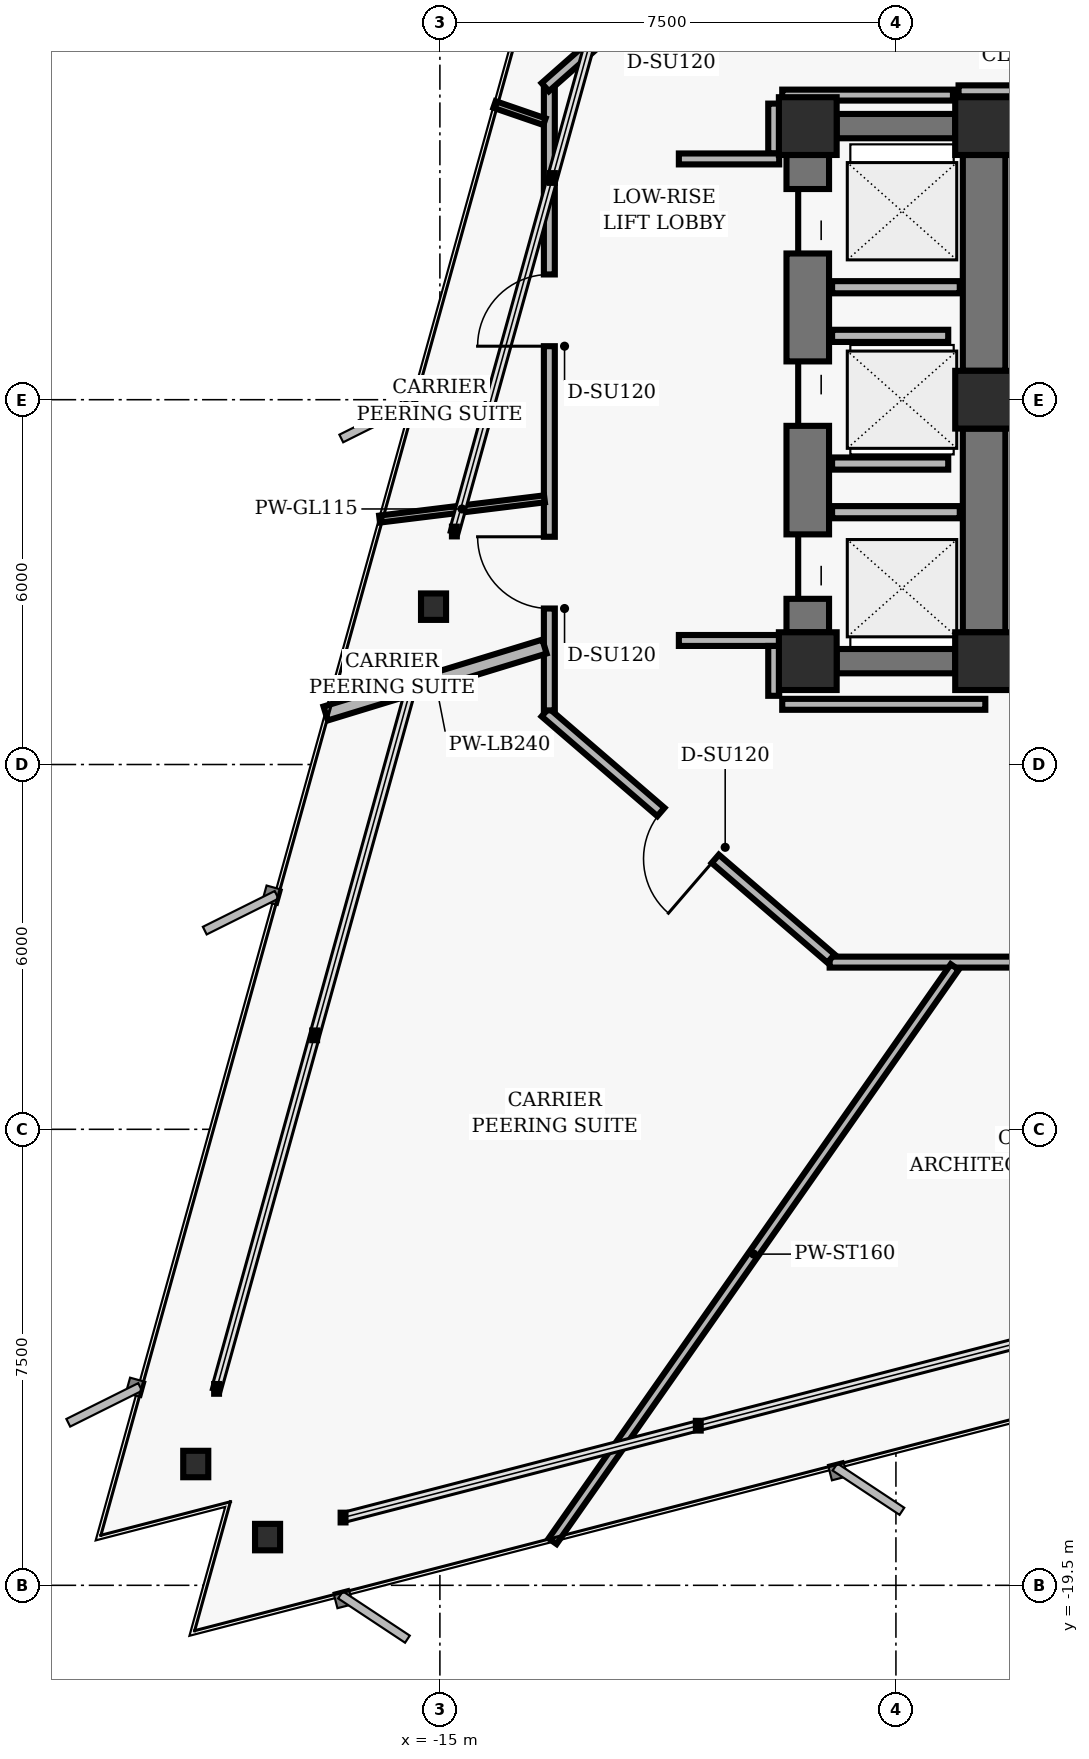
"""IFC4 building model, lengths in metres.
Left out: names, types, materials, properties, quantities, classifications, styles, units other than length and angle.
Written with IfcOpenShell. Run it as: python <this file> out.ifc"""

import sys

from ifc_helpers import new_model, si_unit, direction, frame, frame_2d, origin, origin_2d, place, context, subcontext, project, spatial, rectangle, hollow_rectangle, i_section, extrude, element, fill, save


model = new_model("IFC4")
c1 = context("Model", 3, precision=1e-05, world=origin(), true_north=direction((0.0, 1.0)))
c2 = subcontext(c1, "Body", "Model", "MODEL_VIEW")
j1 = project(units=[si_unit("LENGTHUNIT", "METRE"), si_unit("PLANEANGLEUNIT", "RADIAN")], contexts=[c1])
p1 = place(None, origin())
s1 = spatial("IfcSite", under=j1, at=p1, CompositionType="ELEMENT")
p2 = place(p1, origin())
s2 = spatial("IfcBuilding", under=s1, at=p2, CompositionType="ELEMENT")
p3 = place(p2, frame((0.0, 0.0, 91.68)))
s3 = spatial("IfcBuildingStorey", under=s2, at=p3, CompositionType="ELEMENT", Elevation=91.68)
for number, where, z_axis, x_axis in (
    (1, (-6.05, 4.5, 0.0), (0.0, 0.0, 1.0), (1.0, 0.0, 0.0)),
    (2, (-6.05, 0.0, 0.0), (0.0, 0.0, 1.0), (1.0, 0.0, 0.0)),
    (3, (-6.05, -4.3, 0.0), (0.0, 0.0, 1.0), (1.0, 0.0, 0.0)),
    (4, (-8.95, 4.5, 0.0), (0.0, 0.0, 1.0), (1.0, 0.0, 0.0)),
    (5, (-8.95, -4.3, 0.0), (0.0, 0.0, 1.0), (1.0, 0.0, 0.0)),
):
    element("IfcColumn", number, at=place(p3, frame(where, z_axis=z_axis, x_axis=x_axis)), inside=s3, PredefinedType="COLUMN", context=c2, shape_type="SweptSolid", body=[
        extrude(hollow_rectangle(XDim=0.95, YDim=0.95, WallThickness=0.06, InnerFilletRadius=0.02, OuterFilletRadius=0.04, at=origin_2d()), origin(), (0.0, 0.0, 1.0), 3.04),
    ])
p4 = place(p3, frame((-6.05, 0.475, 0.0), z_axis=(0.0, 0.0, 1.0), x_axis=(0.0, 1.0, 0.0)))
e6 = element("IfcWall", 6, at=p4, inside=s3, PredefinedType="SHEAR", context=c2, shape_type="SweptSolid", body=[
    extrude(rectangle(XDim=3.55, YDim=0.7, at=frame_2d((1.775, 0.0))), origin(), (0.0, 0.0, 1.0), 2.788),
])
p5 = place(p3, frame((-6.05, -3.825, 0.0), z_axis=(0.0, 0.0, 1.0), x_axis=(0.0, 1.0, 0.0)))
e7 = element("IfcWall", 7, at=p5, inside=s3, PredefinedType="SHEAR", context=c2, shape_type="SweptSolid", body=[
    extrude(rectangle(XDim=3.35, YDim=0.7, at=frame_2d((1.675, 0.0))), origin(), (0.0, 0.0, 1.0), 2.788),
])
p6 = place(p3, frame((-8.95, -3.825, 0.0), z_axis=(0.0, 0.0, 1.0), x_axis=(0.0, 1.0, 0.0)))
e8 = element("IfcWall", 8, at=p6, inside=s3, PredefinedType="SHEAR", context=c2, shape_type="SweptSolid", body=[
    extrude(rectangle(XDim=7.85, YDim=0.7, at=frame_2d((3.925, 0.0))), origin(), (0.0, 0.0, 1.0), 2.788),
])
p7 = place(p6, frame((0.55, 0.0, 0.0)))
e9 = element("IfcOpeningElement", 9, at=p7, cuts=e8, PredefinedType="OPENING", context=c2, shape_type="SweptSolid", body=[
    extrude(rectangle(XDim=1.06, YDim=2.04, at=frame_2d((0.53, 1.02))), frame((0.0, 0.36, 0.0), z_axis=(0.0, -1.0, 0.0), x_axis=(1.0, 0.0, 0.0)), (0.0, 0.0, 1.0), 0.72),
])
p8 = place(p6, frame((3.395, 0.0, 0.0)))
e10 = element("IfcOpeningElement", 10, at=p8, cuts=e8, PredefinedType="OPENING", context=c2, shape_type="SweptSolid", body=[
    extrude(rectangle(XDim=1.06, YDim=2.04, at=frame_2d((0.53, 1.02))), frame((0.0, 0.36, 0.0), z_axis=(0.0, -1.0, 0.0), x_axis=(1.0, 0.0, 0.0)), (0.0, 0.0, 1.0), 0.72),
])
p9 = place(p6, frame((6.23, 0.0, 0.0)))
e11 = element("IfcOpeningElement", 11, at=p9, cuts=e8, PredefinedType="OPENING", context=c2, shape_type="SweptSolid", body=[
    extrude(rectangle(XDim=1.06, YDim=2.04, at=frame_2d((0.53, 1.02))), frame((0.0, 0.36, 0.0), z_axis=(0.0, -1.0, 0.0), x_axis=(1.0, 0.0, 0.0)), (0.0, 0.0, 1.0), 0.72),
])
for number, where, z_axis, x_axis in (
    (12, (-8.475, 4.5, 0.0), (0.0, 0.0, 1.0), (1.0, 0.0, 0.0)),
    (13, (-8.475, -4.3, 0.0), (0.0, 0.0, 1.0), (1.0, 0.0, 0.0)),
):
    element("IfcWall", number, at=place(p3, frame(where, z_axis=z_axis, x_axis=x_axis)), inside=s3, PredefinedType="SHEAR", context=c2, shape_type="SweptSolid", body=[
        extrude(rectangle(XDim=1.95, YDim=0.4, at=frame_2d((0.975, 0.0))), origin(), (0.0, 0.0, 1.0), 2.788),
    ])
for number, where, z_axis, x_axis in (
    (14, (-15.104, -3.404, 0.0), (0.0, 0.0, 1.0), (1.0, 0.0, 0.0)),
    (15, (-19.015, -17.505, 0.0), (0.0, 0.0, 1.0), (1.0, 0.0, 0.0)),
    (16, (-17.834, -18.707, 0.0), (0.0, 0.0, 1.0), (1.0, 0.0, 0.0)),
):
    element("IfcColumn", number, at=place(p3, frame(where, z_axis=z_axis, x_axis=x_axis)), inside=s3, PredefinedType="COLUMN", context=c2, shape_type="SweptSolid", body=[
        extrude(i_section(OverallWidth=0.412, OverallDepth=0.435, WebThickness=0.036, FlangeThickness=0.057, FilletRadius=0.022, at=origin_2d()), origin(), (0.0, 0.0, 1.0), 3.04),
    ])
for number, where, z_axis, x_axis in (
    (17, (-8.55, -1.85, 0.0), (0.0, 0.0, 1.0), (1.0, 0.0, 0.0)),
    (18, (-8.55, 1.85, 0.0), (0.0, 0.0, 1.0), (1.0, 0.0, 0.0)),
):
    element("IfcWall", number, at=place(p3, frame(where, z_axis=z_axis, x_axis=x_axis)), inside=s3, PredefinedType="PARTITIONING", context=c2, shape_type="SweptSolid", body=[
        extrude(rectangle(XDim=2.1, YDim=0.2, at=frame_2d((1.05, 0.0))), origin(), (0.0, 0.0, 1.0), 2.763),
    ])
for number, where, z_axis, x_axis in (
    (19, (-8.55, -1.05, 0.0), (0.0, 0.0, 1.0), (1.0, 0.0, 0.0)),
    (20, (-8.55, 1.05, 0.0), (0.0, 0.0, 1.0), (1.0, 0.0, 0.0)),
):
    element("IfcWall", number, at=place(p3, frame(where, z_axis=z_axis, x_axis=x_axis)), inside=s3, PredefinedType="PARTITIONING", context=c2, shape_type="SweptSolid", body=[
        extrude(rectangle(XDim=1.91, YDim=0.2, at=frame_2d((0.955, 0.0))), origin(), (0.0, 0.0, 1.0), 2.763),
    ])
p10 = place(p3, frame((8.41, -9.25, 0.0), z_axis=(0.0, 0.0, 1.0), x_axis=(-1.0, 0.0, 0.0)))
e21 = element("IfcWall", 21, at=p10, inside=s3, PredefinedType="PARTITIONING", context=c2, shape_type="SweptSolid", body=[
    extrude(rectangle(XDim=17.0, YDim=0.18, at=frame_2d((8.5, 0.0))), origin(), (0.0, 0.0, 1.0), 2.277),
])
p11 = place(p10, frame((10.795, 0.0, 0.0)))
e22 = element("IfcOpeningElement", 22, at=p11, cuts=e21, PredefinedType="OPENING", context=c2, shape_type="SweptSolid", body=[
    extrude(rectangle(XDim=0.96, YDim=2.02, at=frame_2d((0.48, 1.01))), frame((0.0, 0.1, 0.0), z_axis=(0.0, -1.0, 0.0), x_axis=(1.0, 0.0, 0.0)), (0.0, 0.0, 1.0), 0.2),
])
p12 = place(p10, frame((3.417, 0.0, 0.0)))
e23 = element("IfcOpeningElement", 23, at=p12, cuts=e21, PredefinedType="OPENING", context=c2, shape_type="SweptSolid", body=[
    extrude(rectangle(XDim=1.02, YDim=2.02, at=frame_2d((0.51, 1.01))), frame((0.0, 0.1, 0.0), z_axis=(0.0, -1.0, 0.0), x_axis=(1.0, 0.0, 0.0)), (0.0, 0.0, 1.0), 0.2),
])
p13 = place(p3, frame((-8.568, -9.191, 0.0), z_axis=(0.0, 0.0, 1.0), x_axis=(-0.757556899173, 0.652769135694, 0.0)))
e24 = element("IfcWall", 24, at=p13, inside=s3, PredefinedType="PARTITIONING", context=c2, shape_type="SweptSolid", body=[
    extrude(rectangle(XDim=6.204, YDim=0.18, at=frame_2d((3.102, 0.0))), origin(), (0.0, 0.0, 1.0), 2.763),
])
p14 = place(p13, frame((2.512, 0.0, 0.0)))
e25 = element("IfcOpeningElement", 25, at=p14, cuts=e24, PredefinedType="OPENING", context=c2, shape_type="SweptSolid", body=[
    extrude(rectangle(XDim=1.18, YDim=2.02, at=frame_2d((0.59, 1.01))), frame((0.0, 0.1, 0.0), z_axis=(0.0, -1.0, 0.0), x_axis=(1.0, 0.0, 0.0)), (0.0, 0.0, 1.0), 0.2),
])
p15 = place(p3, frame((-13.2, -5.11, 0.0), z_axis=(0.0, 0.0, 1.0), x_axis=(0.0, 1.0, 0.0)))
e26 = element("IfcWall", 26, at=p15, inside=s3, PredefinedType="PARTITIONING", context=c2, shape_type="SweptSolid", body=[
    extrude(rectangle(XDim=10.22, YDim=0.18, at=frame_2d((5.11, 0.0))), origin(), (0.0, 0.0, 1.0), 2.143),
])
p16 = place(p15, frame((1.676, 0.0, 0.0)))
e27 = element("IfcOpeningElement", 27, at=p16, cuts=e26, PredefinedType="OPENING", context=c2, shape_type="SweptSolid", body=[
    extrude(rectangle(XDim=1.18, YDim=2.02, at=frame_2d((0.59, 1.01))), frame((0.0, 0.1, 0.0), z_axis=(0.0, -1.0, 0.0), x_axis=(1.0, 0.0, 0.0)), (0.0, 0.0, 1.0), 0.2),
])
p17 = place(p15, frame((5.99, 0.0, 0.0)))
e28 = element("IfcOpeningElement", 28, at=p17, cuts=e26, PredefinedType="OPENING", context=c2, shape_type="SweptSolid", body=[
    extrude(rectangle(XDim=1.18, YDim=2.02, at=frame_2d((0.59, 1.01))), frame((0.0, 0.1, 0.0), z_axis=(0.0, -1.0, 0.0), x_axis=(1.0, 0.0, 0.0)), (0.0, 0.0, 1.0), 0.2),
])
p18 = place(p3, frame((-13.268, 5.14, 0.0), z_axis=(0.0, 0.0, 1.0), x_axis=(0.749626463267, 0.66186113768, 0.0)))
e29 = element("IfcWall", 29, at=p18, inside=s3, PredefinedType="PARTITIONING", context=c2, shape_type="SweptSolid", body=[
    extrude(rectangle(XDim=6.27, YDim=0.18, at=frame_2d((3.135, 0.0))), origin(), (0.0, 0.0, 1.0), 2.763),
])
p19 = place(p18, frame((2.545, 0.0, 0.0)))
e30 = element("IfcOpeningElement", 30, at=p19, cuts=e29, PredefinedType="OPENING", context=c2, shape_type="SweptSolid", body=[
    extrude(rectangle(XDim=1.18, YDim=2.02, at=frame_2d((0.59, 1.01))), frame((0.0, 0.1, 0.0), z_axis=(0.0, -1.0, 0.0), x_axis=(1.0, 0.0, 0.0)), (0.0, 0.0, 1.0), 0.2),
])
p20 = place(p3, frame((-9.51, 4.87, 0.0), z_axis=(0.0, 0.0, 1.0), x_axis=(0.0, -1.0, 0.0)))
e31 = element("IfcWall", 31, at=p20, inside=s3, PredefinedType="PARTITIONING", context=c2, shape_type="SweptSolid", body=[
    extrude(rectangle(XDim=0.82, YDim=0.18, at=frame_2d((0.41, 0.0))), origin(), (0.0, 0.0, 1.0), 2.277),
])
p21 = place(p3, frame((-9.42, 3.96, 0.0), z_axis=(0.0, 0.0, 1.0), x_axis=(-1.0, 0.0, 0.0)))
e32 = element("IfcWall", 32, at=p21, inside=s3, PredefinedType="PARTITIONING", context=c2, shape_type="SweptSolid", body=[
    extrude(rectangle(XDim=1.65, YDim=0.18, at=frame_2d((0.825, 0.0))), origin(), (0.0, 0.0, 1.0), 2.763),
])
p22 = place(p3, frame((-11.07, -3.96, 0.0), z_axis=(0.0, 0.0, 1.0), x_axis=(1.0, 0.0, 0.0)))
e33 = element("IfcWall", 33, at=p22, inside=s3, PredefinedType="PARTITIONING", context=c2, shape_type="SweptSolid", body=[
    extrude(rectangle(XDim=1.65, YDim=0.18, at=frame_2d((0.825, 0.0))), origin(), (0.0, 0.0, 1.0), 2.048),
])
p23 = place(p3, frame((-9.51, -4.05, 0.0), z_axis=(0.0, 0.0, 1.0), x_axis=(0.0, -1.0, 0.0)))
e34 = element("IfcWall", 34, at=p23, inside=s3, PredefinedType="PARTITIONING", context=c2, shape_type="SweptSolid", body=[
    extrude(rectangle(XDim=0.82, YDim=0.18, at=frame_2d((0.41, 0.0))), origin(), (0.0, 0.0, 1.0), 2.763),
])
p24 = place(p3, frame((-9.37, -5.01, 0.0), z_axis=(0.0, 0.0, 1.0), x_axis=(1.0, 0.0, 0.0)))
e35 = element("IfcWall", 35, at=p24, inside=s3, PredefinedType="PARTITIONING", context=c2, shape_type="SweptSolid", body=[
    extrude(rectangle(XDim=3.34, YDim=0.18, at=frame_2d((1.67, 0.0))), origin(), (0.0, 0.0, 1.0), 2.763),
])
p25 = place(p3, frame((-5.55, 5.08, 0.0), z_axis=(0.0, 0.0, 1.0), x_axis=(-1.0, 0.0, 0.0)))
e36 = element("IfcWall", 36, at=p25, inside=s3, PredefinedType="PARTITIONING", context=c2, shape_type="SweptSolid", body=[
    extrude(rectangle(XDim=0.92, YDim=0.18, at=frame_2d((0.46, 0.0))), origin(), (0.0, 0.0, 1.0), 2.763),
])
p26 = place(p3, frame((-6.562, 5.01, 0.0), z_axis=(0.0, 0.0, 1.0), x_axis=(-1.0, 0.0, 0.0)))
e37 = element("IfcWall", 37, at=p26, inside=s3, PredefinedType="PARTITIONING", context=c2, shape_type="SweptSolid", body=[
    extrude(rectangle(XDim=2.808, YDim=0.18, at=frame_2d((1.404, 0.0))), origin(), (0.0, 0.0, 1.0), 2.763),
])
p27 = place(p3, frame((-13.28, -1.631, 0.0), z_axis=(0.0, 0.0, 1.0), x_axis=(-0.992544972431, -0.121878946921, 0.0)))
e38 = element("IfcWall", 38, at=p27, inside=s3, PredefinedType="MOVABLE", context=c2, shape_type="SweptSolid", body=[
    extrude(rectangle(XDim=2.732, YDim=0.115, at=frame_2d((1.366, 0.0))), origin(), (0.0, 0.0, 1.0), 2.763),
])
p28 = place(p3, frame((-13.28, -4.06, 0.0), z_axis=(0.0, 0.0, 1.0), x_axis=(-0.956289598412, -0.292421278244, 0.0)))
e39 = element("IfcWall", 39, at=p28, inside=s3, PredefinedType="PARTITIONING", context=c2, shape_type="SweptSolid", body=[
    extrude(rectangle(XDim=3.763, YDim=0.24, at=frame_2d((1.881, 0.0))), origin(), (0.0, 0.0, 1.0), 2.763),
])
p29 = place(p3, frame((-6.533, -9.33, 0.0), z_axis=(0.0, 0.0, 1.0), x_axis=(-0.573567496354, -0.81915830407, 0.0)))
e40 = element("IfcWall", 40, at=p29, inside=s3, PredefinedType="PARTITIONING", context=c2, shape_type="SweptSolid", body=[
    extrude(rectangle(XDim=11.531, YDim=0.16, at=frame_2d((5.765, 0.0))), origin(), (0.0, 0.0, 1.0), 2.763),
])
p30 = place(p3, frame((-13.28, 4.573, 0.0), z_axis=(0.0, 0.0, 1.0), x_axis=(-0.945516304874, 0.325574749047, 0.0)))
e41 = element("IfcWall", 41, at=p30, inside=s3, PredefinedType="MOVABLE", context=c2, shape_type="SweptSolid", body=[
    extrude(rectangle(XDim=0.868, YDim=0.115, at=frame_2d((0.434, 0.0))), origin(), (0.0, 0.0, 1.0), 2.763),
])
p31 = place(p7, origin())
e42 = element("IfcDoor", 42, at=p31, inside=s3, OperationType="SLIDING_TO_LEFT", PredefinedType="DOOR", context=c2, shape_type="SweptSolid", body=[
    extrude(rectangle(XDim=1.06, YDim=2.04, at=frame_2d((0.53, 1.02))), frame((0.0, 0.025, 0.0), z_axis=(0.0, -1.0, 0.0), x_axis=(1.0, 0.0, 0.0)), (0.0, 0.0, 1.0), 0.05),
])
fill(e9, e42)
p32 = place(p8, origin())
e43 = element("IfcDoor", 43, at=p32, inside=s3, OperationType="SLIDING_TO_RIGHT", PredefinedType="DOOR", context=c2, shape_type="SweptSolid", body=[
    extrude(rectangle(XDim=1.06, YDim=2.04, at=frame_2d((0.53, 1.02))), frame((0.0, 0.025, 0.0), z_axis=(0.0, -1.0, 0.0), x_axis=(1.0, 0.0, 0.0)), (0.0, 0.0, 1.0), 0.05),
])
fill(e10, e43)
p33 = place(p9, origin())
e44 = element("IfcDoor", 44, at=p33, inside=s3, OperationType="SLIDING_TO_LEFT", PredefinedType="DOOR", context=c2, shape_type="SweptSolid", body=[
    extrude(rectangle(XDim=1.06, YDim=2.04, at=frame_2d((0.53, 1.02))), frame((0.0, 0.025, 0.0), z_axis=(0.0, -1.0, 0.0), x_axis=(1.0, 0.0, 0.0)), (0.0, 0.0, 1.0), 0.05),
])
fill(e11, e44)
p34 = place(p16, origin())
e45 = element("IfcDoor", 45, at=p34, inside=s3, OperationType="SINGLE_SWING_RIGHT", PredefinedType="DOOR", context=c2, shape_type="SweptSolid", body=[
    extrude(rectangle(XDim=1.18, YDim=2.02, at=frame_2d((0.59, 1.01))), frame((0.0, 0.025, 0.0), z_axis=(0.0, -1.0, 0.0), x_axis=(1.0, 0.0, 0.0)), (0.0, 0.0, 1.0), 0.05),
])
fill(e27, e45)
p35 = place(p14, origin())
e46 = element("IfcDoor", 46, at=p35, inside=s3, OperationType="SINGLE_SWING_LEFT", PredefinedType="DOOR", context=c2, shape_type="SweptSolid", body=[
    extrude(rectangle(XDim=1.18, YDim=2.02, at=frame_2d((0.59, 1.01))), frame((0.0, 0.025, 0.0), z_axis=(0.0, -1.0, 0.0), x_axis=(1.0, 0.0, 0.0)), (0.0, 0.0, 1.0), 0.05),
])
fill(e25, e46)
p36 = place(p17, origin())
e47 = element("IfcDoor", 47, at=p36, inside=s3, OperationType="SINGLE_SWING_LEFT", PredefinedType="DOOR", context=c2, shape_type="SweptSolid", body=[
    extrude(rectangle(XDim=1.18, YDim=2.02, at=frame_2d((0.59, 1.01))), frame((0.0, 0.025, 0.0), z_axis=(0.0, -1.0, 0.0), x_axis=(1.0, 0.0, 0.0)), (0.0, 0.0, 1.0), 0.05),
])
fill(e28, e47)
save(model, sys.argv[1])
